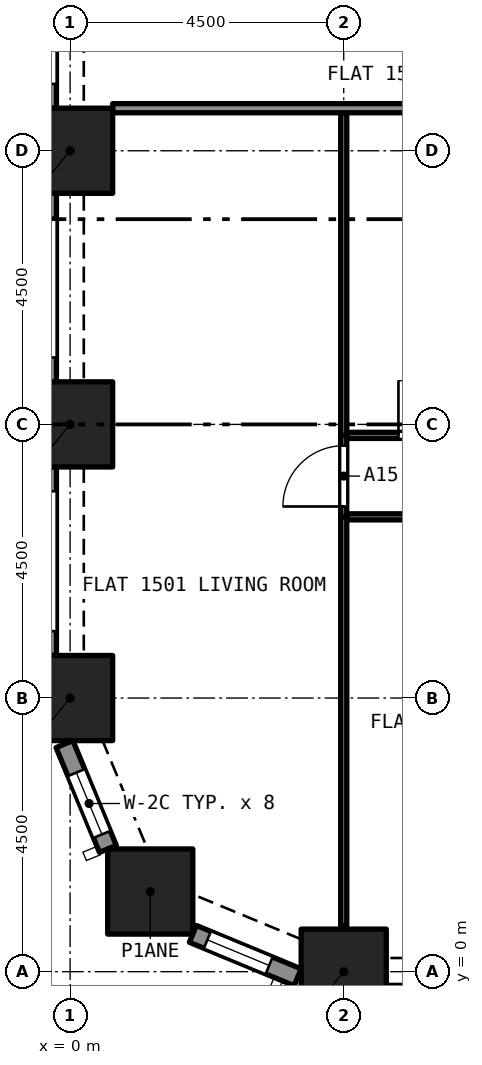
"""IFC4 building model, lengths in metres.
Left out: names, types, materials, properties, quantities, classifications, styles, units other than length and angle.
Written with IfcOpenShell. Run it as: python <this file> out.ifc"""

import sys

from ifc_helpers import new_model, si_unit, direction, frame, frame_2d, origin, origin_2d, place, context, subcontext, project, spatial, rectangle, extrude, element, fill, save


model = new_model("IFC4")
c1 = context("Model", 3, precision=1e-05, world=origin(), true_north=direction((0.0, 1.0)))
c2 = subcontext(c1, "Body", "Model", "MODEL_VIEW")
j1 = project(units=[si_unit("LENGTHUNIT", "METRE"), si_unit("PLANEANGLEUNIT", "RADIAN")], contexts=[c1])
p1 = place(None, origin())
s1 = spatial("IfcSite", under=j1, at=p1, CompositionType="ELEMENT")
p2 = place(p1, origin())
s2 = spatial("IfcBuilding", under=s1, at=p2, CompositionType="ELEMENT")
p3 = place(p2, frame((0.0, 0.0, 59.2)))
s3 = spatial("IfcBuildingStorey", under=s2, at=p3, CompositionType="ELEMENT", Elevation=59.2)
for number, where, z_axis, x_axis in (
    (1, (4.5, 0.0, 0.0), (0.0, 0.0, 1.0), (1.0, 0.0, 0.0)),
    (2, (1.318, 1.318, 0.0), (0.0, 0.0, 1.0), (1.0, 0.0, 0.0)),
    (3, (0.0, 4.5, 0.0), (0.0, 0.0, 1.0), (1.0, 0.0, 0.0)),
    (4, (0.0, 9.0, 0.0), (0.0, 0.0, 1.0), (1.0, 0.0, 0.0)),
    (5, (0.0, 13.5, 0.0), (0.0, 0.0, 1.0), (1.0, 0.0, 0.0)),
):
    element("IfcColumn", number, at=place(p3, frame(where, z_axis=z_axis, x_axis=x_axis)), inside=s3, PredefinedType="COLUMN", context=c2, shape_type="SweptSolid", body=[
        extrude(rectangle(XDim=1.4, YDim=1.4, at=origin_2d()), origin(), (0.0, 0.0, 1.0), 3.2),
    ])
p4 = place(p3, frame((0.622, 2.02, 0.0), z_axis=(0.0, 0.0, 1.0), x_axis=(-0.38262540684, 0.923903565336, 0.0)))
e6 = element("IfcWall", 6, at=p4, inside=s3, PredefinedType="SOLIDWALL", context=c2, shape_type="SweptSolid", body=[
    extrude(rectangle(XDim=1.865, YDim=0.3, at=frame_2d((0.933, 0.0))), origin(), (0.0, 0.0, 1.0), 3.2),
])
p5 = place(p4, frame((0.258, 0.0, 0.45)))
e7 = element("IfcOpeningElement", 7, at=p5, cuts=e6, PredefinedType="OPENING", context=c2, shape_type="SweptSolid", body=[
    extrude(rectangle(XDim=1.1, YDim=1.95, at=frame_2d((0.55, 0.975))), frame((0.0, 0.16, 0.0), z_axis=(0.0, -1.0, 0.0), x_axis=(1.0, 0.0, 0.0)), (0.0, 0.0, 1.0), 0.32),
])
p6 = place(p3, frame((3.743, -0.092, 0.0), z_axis=(0.0, 0.0, 1.0), x_axis=(-0.923857286003, 0.382737135771, 0.0)))
e8 = element("IfcWall", 8, at=p6, inside=s3, PredefinedType="SOLIDWALL", context=c2, shape_type="SweptSolid", body=[
    extrude(rectangle(XDim=1.865, YDim=0.3, at=frame_2d((0.933, 0.0))), origin(), (0.0, 0.0, 1.0), 3.2),
])
p7 = place(p6, frame((0.508, 0.0, 0.45)))
e9 = element("IfcOpeningElement", 9, at=p7, cuts=e8, PredefinedType="OPENING", context=c2, shape_type="SweptSolid", body=[
    extrude(rectangle(XDim=1.1, YDim=1.95, at=frame_2d((0.55, 0.975))), frame((0.0, 0.16, 0.0), z_axis=(0.0, -1.0, 0.0), x_axis=(1.0, 0.0, 0.0)), (0.0, 0.0, 1.0), 0.32),
])
p8 = place(p3, frame((-0.375, 14.2, 0.0), z_axis=(0.0, 0.0, 1.0), x_axis=(0.0, 1.0, 0.0)))
e10 = element("IfcWall", 10, at=p8, inside=s3, PredefinedType="SOLIDWALL", context=c2, shape_type="SweptSolid", body=[
    extrude(rectangle(XDim=3.1, YDim=0.3, at=frame_2d((1.55, 0.0))), origin(), (0.0, 0.0, 1.0), 3.2),
])
p9 = place(p8, frame((0.4, 0.0, 0.45)))
e11 = element("IfcOpeningElement", 11, at=p9, cuts=e10, PredefinedType="OPENING", context=c2, shape_type="SweptSolid", body=[
    extrude(rectangle(XDim=2.3, YDim=1.95, at=frame_2d((1.15, 0.975))), frame((0.0, 0.16, 0.0), z_axis=(0.0, -1.0, 0.0), x_axis=(1.0, 0.0, 0.0)), (0.0, 0.0, 1.0), 0.32),
])
p10 = place(p3, frame((-0.375, 9.7, 0.0), z_axis=(0.0, 0.0, 1.0), x_axis=(0.0, 1.0, 0.0)))
e12 = element("IfcWall", 12, at=p10, inside=s3, PredefinedType="SOLIDWALL", context=c2, shape_type="SweptSolid", body=[
    extrude(rectangle(XDim=3.1, YDim=0.3, at=frame_2d((1.55, 0.0))), origin(), (0.0, 0.0, 1.0), 3.2),
])
p11 = place(p10, frame((0.4, 0.0, 0.45)))
e13 = element("IfcOpeningElement", 13, at=p11, cuts=e12, PredefinedType="OPENING", context=c2, shape_type="SweptSolid", body=[
    extrude(rectangle(XDim=2.3, YDim=1.95, at=frame_2d((1.15, 0.975))), frame((0.0, 0.16, 0.0), z_axis=(0.0, -1.0, 0.0), x_axis=(1.0, 0.0, 0.0)), (0.0, 0.0, 1.0), 0.32),
])
p12 = place(p3, frame((-0.375, 5.2, 0.0), z_axis=(0.0, 0.0, 1.0), x_axis=(0.0, 1.0, 0.0)))
e14 = element("IfcWall", 14, at=p12, inside=s3, PredefinedType="SOLIDWALL", context=c2, shape_type="SweptSolid", body=[
    extrude(rectangle(XDim=3.1, YDim=0.3, at=frame_2d((1.55, 0.0))), origin(), (0.0, 0.0, 1.0), 3.2),
])
p13 = place(p12, frame((0.4, 0.0, 0.45)))
e15 = element("IfcOpeningElement", 15, at=p13, cuts=e14, PredefinedType="OPENING", context=c2, shape_type="SweptSolid", body=[
    extrude(rectangle(XDim=2.3, YDim=1.95, at=frame_2d((1.15, 0.975))), frame((0.0, 0.16, 0.0), z_axis=(0.0, -1.0, 0.0), x_axis=(1.0, 0.0, 0.0)), (0.0, 0.0, 1.0), 0.32),
])
p14 = place(p3, frame((9.0, 7.48, 0.0), z_axis=(0.0, 0.0, 1.0), x_axis=(-1.0, 0.0, 0.0)))
e16 = element("IfcWall", 16, at=p14, inside=s3, PredefinedType="PARTITIONING", context=c2, shape_type="SweptSolid", body=[
    extrude(rectangle(XDim=4.45, YDim=0.1, at=frame_2d((2.225, 0.0))), origin(), (0.0, 0.0, 1.0), 2.9),
])
p15 = place(p14, frame((1.8, 0.0, 0.0)))
e17 = element("IfcOpeningElement", 17, at=p15, cuts=e16, PredefinedType="OPENING", context=c2, shape_type="SweptSolid", body=[
    extrude(rectangle(XDim=0.9, YDim=2.1, at=frame_2d((0.45, 1.05))), frame((0.0, 0.06, 0.0), z_axis=(0.0, -1.0, 0.0), x_axis=(1.0, 0.0, 0.0)), (0.0, 0.0, 1.0), 0.12),
])
p16 = place(p3, frame((4.5, 0.758, 0.0), z_axis=(0.0, 0.0, 1.0), x_axis=(0.0, 1.0, 0.0)))
e18 = element("IfcWall", 18, at=p16, inside=s3, PredefinedType="PARTITIONING", context=c2, shape_type="SweptSolid", body=[
    extrude(rectangle(XDim=6.722, YDim=0.1, at=frame_2d((3.361, 0.0))), origin(), (0.0, 0.0, 1.0), 2.9),
])
p17 = place(p3, frame((4.55, 8.82, 0.0), z_axis=(0.0, 0.0, 1.0), x_axis=(1.0, 0.0, 0.0)))
e19 = element("IfcWall", 19, at=p17, inside=s3, PredefinedType="PARTITIONING", context=c2, shape_type="SweptSolid", body=[
    extrude(rectangle(XDim=2.7, YDim=0.1, at=frame_2d((1.35, 0.0))), origin(), (0.0, 0.0, 1.0), 2.9),
])
p18 = place(p17, frame((0.85, 0.0, 0.0)))
e20 = element("IfcOpeningElement", 20, at=p18, cuts=e19, PredefinedType="OPENING", context=c2, shape_type="SweptSolid", body=[
    extrude(rectangle(XDim=0.9, YDim=2.1, at=frame_2d((0.45, 1.05))), frame((0.0, 0.06, 0.0), z_axis=(0.0, -1.0, 0.0), x_axis=(1.0, 0.0, 0.0)), (0.0, 0.0, 1.0), 0.12),
])
p19 = place(p3, frame((4.5, 7.48, 0.0), z_axis=(0.0, 0.0, 1.0), x_axis=(0.0, 1.0, 0.0)))
e21 = element("IfcWall", 21, at=p19, inside=s3, PredefinedType="PARTITIONING", context=c2, shape_type="SweptSolid", body=[
    extrude(rectangle(XDim=1.34, YDim=0.1, at=frame_2d((0.67, 0.0))), origin(), (0.0, 0.0, 1.0), 2.9),
])
p20 = place(p19, frame((0.17, 0.0, 0.0)))
e22 = element("IfcOpeningElement", 22, at=p20, cuts=e21, PredefinedType="OPENING", context=c2, shape_type="SweptSolid", body=[
    extrude(rectangle(XDim=1.0, YDim=2.1, at=frame_2d((0.5, 1.05))), frame((0.0, 0.06, 0.0), z_axis=(0.0, -1.0, 0.0), x_axis=(1.0, 0.0, 0.0)), (0.0, 0.0, 1.0), 0.12),
])
p21 = place(p3, frame((4.5, 8.82, 0.0), z_axis=(0.0, 0.0, 1.0), x_axis=(0.0, 1.0, 0.0)))
e23 = element("IfcWall", 23, at=p21, inside=s3, PredefinedType="PARTITIONING", context=c2, shape_type="SweptSolid", body=[
    extrude(rectangle(XDim=5.305, YDim=0.1, at=frame_2d((2.652, 0.0))), origin(), (0.0, 0.0, 1.0), 2.9),
])
p22 = place(p3, frame((0.7, 14.2, 0.0), z_axis=(0.0, 0.0, 1.0), x_axis=(1.0, 0.0, 0.0)))
e24 = element("IfcWall", 24, at=p22, inside=s3, PredefinedType="PARTITIONING", context=c2, shape_type="SweptSolid", body=[
    extrude(rectangle(XDim=6.5, YDim=0.15, at=frame_2d((3.25, 0.0))), origin(), (0.0, 0.0, 1.0), 2.9),
])
p23 = place(p5, origin())
e25 = element("IfcWindow", 25, at=p23, inside=s3, PartitioningType="SINGLE_PANEL", PredefinedType="WINDOW", context=c2, shape_type="SweptSolid", body=[
    extrude(rectangle(XDim=1.1, YDim=1.95, at=frame_2d((0.55, 0.975))), frame((0.0, 0.03, 0.0), z_axis=(0.0, -1.0, 0.0), x_axis=(1.0, 0.0, 0.0)), (0.0, 0.0, 1.0), 0.06),
])
fill(e7, e25)
p24 = place(p7, origin())
e26 = element("IfcWindow", 26, at=p24, inside=s3, PartitioningType="SINGLE_PANEL", PredefinedType="WINDOW", context=c2, shape_type="SweptSolid", body=[
    extrude(rectangle(XDim=1.1, YDim=1.95, at=frame_2d((0.55, 0.975))), frame((0.0, 0.03, 0.0), z_axis=(0.0, -1.0, 0.0), x_axis=(1.0, 0.0, 0.0)), (0.0, 0.0, 1.0), 0.06),
])
fill(e9, e26)
p25 = place(p18, origin())
e27 = element("IfcDoor", 27, at=p25, inside=s3, OperationType="SINGLE_SWING_LEFT", PredefinedType="DOOR", context=c2, shape_type="SweptSolid", body=[
    extrude(rectangle(XDim=0.9, YDim=2.1, at=frame_2d((0.45, 1.05))), frame((0.0, 0.025, 0.0), z_axis=(0.0, -1.0, 0.0), x_axis=(1.0, 0.0, 0.0)), (0.0, 0.0, 1.0), 0.05),
])
fill(e20, e27)
p26 = place(p20, origin())
e28 = element("IfcDoor", 28, at=p26, inside=s3, OperationType="SINGLE_SWING_RIGHT", PredefinedType="DOOR", context=c2, shape_type="SweptSolid", body=[
    extrude(rectangle(XDim=1.0, YDim=2.1, at=frame_2d((0.5, 1.05))), frame((0.0, 0.025, 0.0), z_axis=(0.0, -1.0, 0.0), x_axis=(1.0, 0.0, 0.0)), (0.0, 0.0, 1.0), 0.05),
])
fill(e22, e28)
save(model, sys.argv[1])
